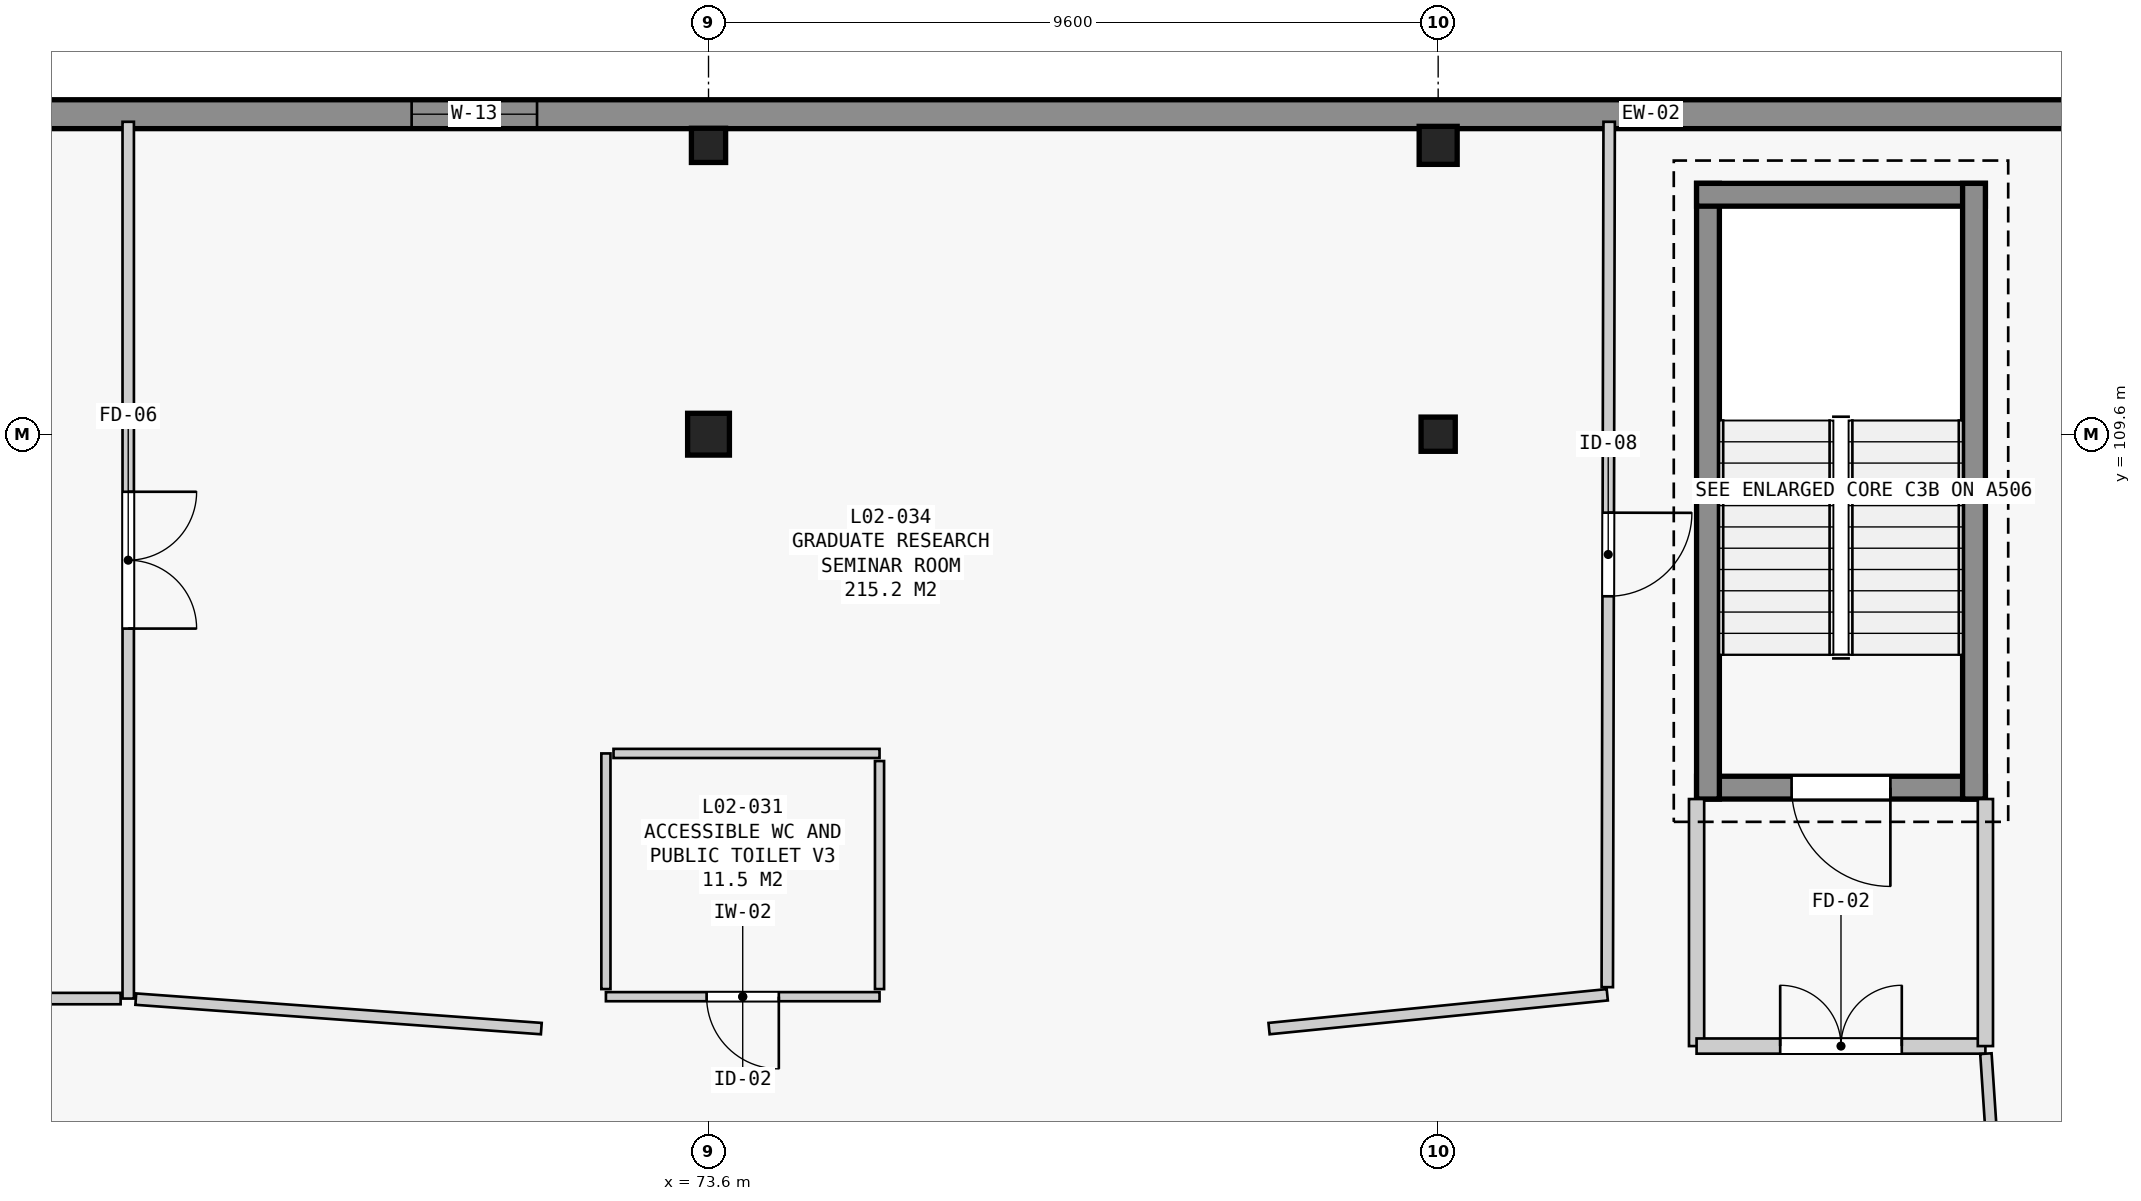
"""IFC4 building model, lengths in metres.
Left out: names, types, materials, properties, quantities, classifications, styles, units other than length and angle.
Written with IfcOpenShell. Run it as: python <this file> out.ifc"""

import sys

from ifc_helpers import new_model, si_unit, direction, frame, frame_2d, origin, origin_2d, place, context, subcontext, project, spatial, rectangle, extrude, element, fill, save


model = new_model("IFC4")
c1 = context("Model", 3, precision=1e-05, world=origin(), true_north=direction((0.0, 1.0)))
c2 = subcontext(c1, "Body", "Model", "MODEL_VIEW")
j1 = project(units=[si_unit("LENGTHUNIT", "METRE"), si_unit("PLANEANGLEUNIT", "RADIAN")], contexts=[c1])
p1 = place(None, origin())
s1 = spatial("IfcSite", under=j1, at=p1, CompositionType="ELEMENT")
p2 = place(p1, origin())
s2 = spatial("IfcBuilding", under=s1, at=p2, CompositionType="ELEMENT")
p3 = place(p2, frame((0.0, 0.0, 9.6)))
s3 = spatial("IfcBuildingStorey", under=s2, at=p3, CompositionType="ELEMENT", Elevation=9.6)
p4 = place(p3, frame((73.6, 109.6, 0.0), z_axis=(0.0, 0.0, 1.0), x_axis=(1.0, 0.0, 0.0)))
e1 = element("IfcColumn", 1, at=p4, inside=s3, PredefinedType="COLUMN", context=c2, shape_type="SweptSolid", body=[
    extrude(rectangle(XDim=0.55, YDim=0.55, at=origin_2d()), origin(), (0.0, 0.0, 1.0), 4.2),
])
for number, where, z_axis, x_axis in (
    (2, (73.6, 113.4, 0.0), (0.0, 0.0, 1.0), (1.0, 0.0, 0.0)),
    (3, (83.2, 109.6, 0.0), (0.0, 0.0, 1.0), (1.0, 0.0, 0.0)),
):
    element("IfcColumn", number, at=place(p3, frame(where, z_axis=z_axis, x_axis=x_axis)), inside=s3, PredefinedType="COLUMN", context=c2, shape_type="SweptSolid", body=[
        extrude(rectangle(XDim=0.45, YDim=0.45, at=origin_2d()), origin(), (0.0, 0.0, 1.0), 4.2),
    ])
p5 = place(p3, frame((83.2, 113.4, 0.0), z_axis=(0.0, 0.0, 1.0), x_axis=(1.0, 0.0, 0.0)))
e4 = element("IfcColumn", 4, at=p5, inside=s3, PredefinedType="COLUMN", context=c2, shape_type="SweptSolid", body=[
    extrude(rectangle(XDim=0.5, YDim=0.5, at=origin_2d()), origin(), (0.0, 0.0, 1.0), 4.2),
])
p6 = place(p3, frame((46.29, 113.81, 0.0), z_axis=(0.0, 0.0, 1.0), x_axis=(1.0, 0.0, 0.0)))
e5 = element("IfcWall", 5, at=p6, inside=s3, PredefinedType="STANDARD", context=c2, shape_type="SweptSolid", body=[
    extrude(rectangle(XDim=78.32, YDim=0.38, at=frame_2d((39.16, 0.0))), origin(), (0.0, 0.0, 1.0), 3.92),
])
p7 = place(p6, frame((23.404, 0.0, 1.05)))
e6 = element("IfcOpeningElement", 6, at=p7, cuts=e5, PredefinedType="OPENING", context=c2, shape_type="SweptSolid", body=[
    extrude(rectangle(XDim=1.65, YDim=2.2, at=frame_2d((0.825, 1.1))), frame((0.0, 0.2, 0.0), z_axis=(0.0, -1.0, 0.0), x_axis=(1.0, 0.0, 0.0)), (0.0, 0.0, 1.0), 0.4),
])
p8 = place(p6, frame((50.791, 0.0, 1.05)))
e7 = element("IfcOpeningElement", 7, at=p8, cuts=e5, PredefinedType="OPENING", context=c2, shape_type="SweptSolid", body=[
    extrude(rectangle(XDim=1.8, YDim=2.5, at=frame_2d((0.9, 1.25))), frame((0.0, 0.2, 0.0), z_axis=(0.0, -1.0, 0.0), x_axis=(1.0, 0.0, 0.0)), (0.0, 0.0, 1.0), 0.4),
])
p9 = place(p3, frame((90.4, 104.95, 0.0), z_axis=(0.0, 0.0, 1.0), x_axis=(-1.0, 0.0, 0.0)))
e8 = element("IfcWall", 8, at=p9, inside=s3, PredefinedType="SHEAR", context=c2, shape_type="SweptSolid", body=[
    extrude(rectangle(XDim=3.8, YDim=0.3, at=frame_2d((1.9, 0.0))), origin(), (0.0, 0.0, 1.0), 3.92),
])
p10 = place(p9, frame((1.25, 0.0, 0.0)))
e9 = element("IfcOpeningElement", 9, at=p10, cuts=e8, PredefinedType="OPENING", context=c2, shape_type="SweptSolid", body=[
    extrude(rectangle(XDim=1.3, YDim=2.2, at=frame_2d((0.65, 1.1))), frame((0.0, 0.16, 0.0), z_axis=(0.0, -1.0, 0.0), x_axis=(1.0, 0.0, 0.0)), (0.0, 0.0, 1.0), 0.32),
])
p11 = place(p3, frame((86.75, 104.8, 0.0), z_axis=(0.0, 0.0, 1.0), x_axis=(0.0, 1.0, 0.0)))
e10 = element("IfcWall", 10, at=p11, inside=s3, PredefinedType="SHEAR", context=c2, shape_type="SweptSolid", body=[
    extrude(rectangle(XDim=8.1, YDim=0.3, at=frame_2d((4.05, 0.0))), origin(), (0.0, 0.0, 1.0), 3.92),
])
p12 = place(p3, frame((86.6, 112.75, 0.0), z_axis=(0.0, 0.0, 1.0), x_axis=(1.0, 0.0, 0.0)))
e11 = element("IfcWall", 11, at=p12, inside=s3, PredefinedType="SHEAR", context=c2, shape_type="SweptSolid", body=[
    extrude(rectangle(XDim=3.8, YDim=0.3, at=frame_2d((1.9, 0.0))), origin(), (0.0, 0.0, 1.0), 3.92),
])
p13 = place(p3, frame((90.25, 112.9, 0.0), z_axis=(0.0, 0.0, 1.0), x_axis=(0.0, -1.0, 0.0)))
e12 = element("IfcWall", 12, at=p13, inside=s3, PredefinedType="SHEAR", context=c2, shape_type="SweptSolid", body=[
    extrude(rectangle(XDim=8.1, YDim=0.3, at=frame_2d((4.05, 0.0))), origin(), (0.0, 0.0, 1.0), 3.92),
])
p14 = place(p3, frame((86.6, 104.8, 0.0), z_axis=(0.0, 0.0, 1.0), x_axis=(0.0, -1.0, 0.0)))
e13 = element("IfcWall", 13, at=p14, inside=s3, PredefinedType="STANDARD", context=c2, shape_type="SweptSolid", body=[
    extrude(rectangle(XDim=3.25, YDim=0.2, at=frame_2d((1.625, 0.0))), origin(), (0.0, 0.0, 1.0), 3.92),
])
p15 = place(p3, frame((86.6, 101.55, 0.0), z_axis=(0.0, 0.0, 1.0), x_axis=(1.0, 0.0, 0.0)))
e14 = element("IfcWall", 14, at=p15, inside=s3, PredefinedType="STANDARD", context=c2, shape_type="SweptSolid", body=[
    extrude(rectangle(XDim=3.8, YDim=0.2, at=frame_2d((1.9, 0.0))), origin(), (0.0, 0.0, 1.0), 3.92),
])
p16 = place(p15, frame((1.1, 0.0, 0.0)))
e15 = element("IfcOpeningElement", 15, at=p16, cuts=e14, PredefinedType="OPENING", context=c2, shape_type="SweptSolid", body=[
    extrude(rectangle(XDim=1.6, YDim=2.2, at=frame_2d((0.8, 1.1))), frame((0.0, 0.11, 0.0), z_axis=(0.0, -1.0, 0.0), x_axis=(1.0, 0.0, 0.0)), (0.0, 0.0, 1.0), 0.22),
])
p17 = place(p3, frame((90.4, 101.55, 0.0), z_axis=(0.0, 0.0, 1.0), x_axis=(0.0, 1.0, 0.0)))
e16 = element("IfcWall", 16, at=p17, inside=s3, PredefinedType="STANDARD", context=c2, shape_type="SweptSolid", body=[
    extrude(rectangle(XDim=3.25, YDim=0.2, at=frame_2d((1.625, 0.0))), origin(), (0.0, 0.0, 1.0), 3.92),
])
p18 = place(p3, frame((75.85, 102.2, 0.0), z_axis=(0.0, 0.0, 1.0), x_axis=(-1.0, 0.0, 0.0)))
e17 = element("IfcWall", 17, at=p18, inside=s3, PredefinedType="PARTITIONING", context=c2, shape_type="SweptSolid", body=[
    extrude(rectangle(XDim=3.6, YDim=0.12, at=frame_2d((1.8, 0.0))), origin(), (0.0, 0.0, 1.0), 3.25),
])
p19 = place(p18, frame((1.325, 0.0, 0.0)))
e18 = element("IfcOpeningElement", 18, at=p19, cuts=e17, PredefinedType="OPENING", context=c2, shape_type="SweptSolid", body=[
    extrude(rectangle(XDim=0.95, YDim=2.15, at=frame_2d((0.475, 1.075))), frame((0.0, 0.07, 0.0), z_axis=(0.0, -1.0, 0.0), x_axis=(1.0, 0.0, 0.0)), (0.0, 0.0, 1.0), 0.14),
])
p20 = place(p3, frame((72.25, 102.3, 0.0), z_axis=(0.0, 0.0, 1.0), x_axis=(0.0, 1.0, 0.0)))
e19 = element("IfcWall", 19, at=p20, inside=s3, PredefinedType="PARTITIONING", context=c2, shape_type="SweptSolid", body=[
    extrude(rectangle(XDim=3.1, YDim=0.12, at=frame_2d((1.55, 0.0))), origin(), (0.0, 0.0, 1.0), 3.92),
])
p21 = place(p3, frame((72.35, 105.4, 0.0), z_axis=(0.0, 0.0, 1.0), x_axis=(1.0, 0.0, 0.0)))
e20 = element("IfcWall", 20, at=p21, inside=s3, PredefinedType="PARTITIONING", context=c2, shape_type="SweptSolid", body=[
    extrude(rectangle(XDim=3.5, YDim=0.12, at=frame_2d((1.75, 0.0))), origin(), (0.0, 0.0, 1.0), 3.25),
])
p22 = place(p3, frame((75.85, 105.3, 0.0), z_axis=(0.0, 0.0, 1.0), x_axis=(0.0, -1.0, 0.0)))
e21 = element("IfcWall", 21, at=p22, inside=s3, PredefinedType="PARTITIONING", context=c2, shape_type="SweptSolid", body=[
    extrude(rectangle(XDim=3.0, YDim=0.12, at=frame_2d((1.5, 0.0))), origin(), (0.0, 0.0, 1.0), 3.92),
])
p23 = place(p3, frame((65.965, 113.71, 0.0), z_axis=(0.0, 0.0, 1.0), x_axis=(0.0, -1.0, 0.0)))
e22 = element("IfcWall", 22, at=p23, inside=s3, PredefinedType="PARTITIONING", context=c2, shape_type="SweptSolid", body=[
    extrude(rectangle(XDim=11.535, YDim=0.15, at=frame_2d((5.768, 0.0))), origin(), (0.0, 0.0, 1.0), 2.715),
])
p24 = place(p23, frame((4.867, 0.0, 0.0)))
e23 = element("IfcOpeningElement", 23, at=p24, cuts=e22, PredefinedType="OPENING", context=c2, shape_type="SweptSolid", body=[
    extrude(rectangle(XDim=1.8, YDim=2.2, at=frame_2d((0.9, 1.1))), frame((0.0, 0.085, 0.0), z_axis=(0.0, -1.0, 0.0), x_axis=(1.0, 0.0, 0.0)), (0.0, 0.0, 1.0), 0.17),
])
p25 = place(p3, frame((65.865, 102.175, 0.0), z_axis=(0.0, 0.0, 1.0), x_axis=(-1.0, 0.0, 0.0)))
e24 = element("IfcWall", 24, at=p25, inside=s3, PredefinedType="PARTITIONING", context=c2, shape_type="SweptSolid", body=[
    extrude(rectangle(XDim=4.365, YDim=0.15, at=frame_2d((2.183, 0.0))), origin(), (0.0, 0.0, 1.0), 3.25),
])
p26 = place(p3, frame((85.425, 102.225, 0.0), z_axis=(0.0, 0.0, 1.0), x_axis=(-0.995035568554, -0.099519934244, 0.0)))
e25 = element("IfcWall", 25, at=p26, inside=s3, PredefinedType="PARTITIONING", context=c2, shape_type="SweptSolid", body=[
    extrude(rectangle(XDim=4.472, YDim=0.15, at=frame_2d((2.236, 0.0))), origin(), (0.0, 0.0, 1.0), 3.25),
])
p27 = place(p3, frame((71.4, 101.78, 0.0), z_axis=(0.0, 0.0, 1.0), x_axis=(-0.997370137552, 0.072476263142, 0.0)))
e26 = element("IfcWall", 26, at=p27, inside=s3, PredefinedType="PARTITIONING", context=c2, shape_type="SweptSolid", body=[
    extrude(rectangle(XDim=5.349, YDim=0.15, at=frame_2d((2.675, 0.0))), origin(), (0.0, 0.0, 1.0), 3.4),
])
p28 = place(p3, frame((85.45, 113.71, 0.0), z_axis=(0.0, 0.0, 1.0), x_axis=(-0.002144399247, -0.999997700773, 0.0)))
e27 = element("IfcWall", 27, at=p28, inside=s3, PredefinedType="PARTITIONING", context=c2, shape_type="SweptSolid", body=[
    extrude(rectangle(XDim=11.385, YDim=0.15, at=frame_2d((5.692, 0.0))), origin(), (0.0, 0.0, 1.0), 2.715),
])
p29 = place(p28, frame((5.143, 0.0, 0.0)))
e28 = element("IfcOpeningElement", 28, at=p29, cuts=e27, PredefinedType="OPENING", context=c2, shape_type="SweptSolid", body=[
    extrude(rectangle(XDim=1.1, YDim=2.2, at=frame_2d((0.55, 1.1))), frame((0.0, 0.085, 0.0), z_axis=(0.0, -1.0, 0.0), x_axis=(1.0, 0.0, 0.0)), (0.0, 0.0, 1.0), 0.17),
])
p30 = place(p3, frame((90.593, 98.65, 0.0), z_axis=(0.0, 0.0, 1.0), x_axis=(-0.066461272894, 0.997789005354, 0.0)))
e29 = element("IfcWall", 29, at=p30, inside=s3, PredefinedType="PARTITIONING", context=c2, shape_type="SweptSolid", body=[
    extrude(rectangle(XDim=2.806, YDim=0.15, at=frame_2d((1.403, 0.0))), origin(), (0.0, 0.0, 1.0), 3.25),
])
p31 = place(p7, origin())
e30 = element("IfcWindow", 30, at=p31, inside=s3, PartitioningType="SINGLE_PANEL", PredefinedType="WINDOW", context=c2, shape_type="SweptSolid", body=[
    extrude(rectangle(XDim=1.65, YDim=2.2, at=frame_2d((0.825, 1.1))), frame((0.0, 0.03, 0.0), z_axis=(0.0, -1.0, 0.0), x_axis=(1.0, 0.0, 0.0)), (0.0, 0.0, 1.0), 0.06),
])
fill(e6, e30)
p32 = place(p10, origin())
e31 = element("IfcDoor", 31, at=p32, inside=s3, OperationType="SINGLE_SWING_LEFT", PredefinedType="DOOR", context=c2, shape_type="SweptSolid", body=[
    extrude(rectangle(XDim=1.3, YDim=2.2, at=frame_2d((0.65, 1.1))), frame((0.0, 0.025, 0.0), z_axis=(0.0, -1.0, 0.0), x_axis=(1.0, 0.0, 0.0)), (0.0, 0.0, 1.0), 0.05),
])
fill(e9, e31)
p33 = place(p16, origin())
e32 = element("IfcDoor", 32, at=p33, inside=s3, OperationType="DOUBLE_DOOR_SINGLE_SWING", PredefinedType="DOOR", context=c2, shape_type="SweptSolid", body=[
    extrude(rectangle(XDim=1.6, YDim=2.2, at=frame_2d((0.8, 1.1))), frame((0.0, 0.025, 0.0), z_axis=(0.0, -1.0, 0.0), x_axis=(1.0, 0.0, 0.0)), (0.0, 0.0, 1.0), 0.05),
])
fill(e15, e32)
p34 = place(p19, origin())
e33 = element("IfcDoor", 33, at=p34, inside=s3, OperationType="SINGLE_SWING_LEFT", PredefinedType="DOOR", context=c2, shape_type="SweptSolid", body=[
    extrude(rectangle(XDim=0.95, YDim=2.15, at=frame_2d((0.475, 1.075))), frame((0.0, 0.025, 0.0), z_axis=(0.0, -1.0, 0.0), x_axis=(1.0, 0.0, 0.0)), (0.0, 0.0, 1.0), 0.05),
])
fill(e18, e33)
p35 = place(p24, origin())
e34 = element("IfcDoor", 34, at=p35, inside=s3, OperationType="DOUBLE_DOOR_SINGLE_SWING", PredefinedType="DOOR", context=c2, shape_type="SweptSolid", body=[
    extrude(rectangle(XDim=1.8, YDim=2.2, at=frame_2d((0.9, 1.1))), frame((0.0, 0.025, 0.0), z_axis=(0.0, -1.0, 0.0), x_axis=(1.0, 0.0, 0.0)), (0.0, 0.0, 1.0), 0.05),
])
fill(e23, e34)
p36 = place(p29, origin())
e35 = element("IfcDoor", 35, at=p36, inside=s3, OperationType="SINGLE_SWING_LEFT", PredefinedType="DOOR", context=c2, shape_type="SweptSolid", body=[
    extrude(rectangle(XDim=1.1, YDim=2.2, at=frame_2d((0.55, 1.1))), frame((0.0, 0.025, 0.0), z_axis=(0.0, -1.0, 0.0), x_axis=(1.0, 0.0, 0.0)), (0.0, 0.0, 1.0), 0.05),
])
fill(e28, e35)
save(model, sys.argv[1])
